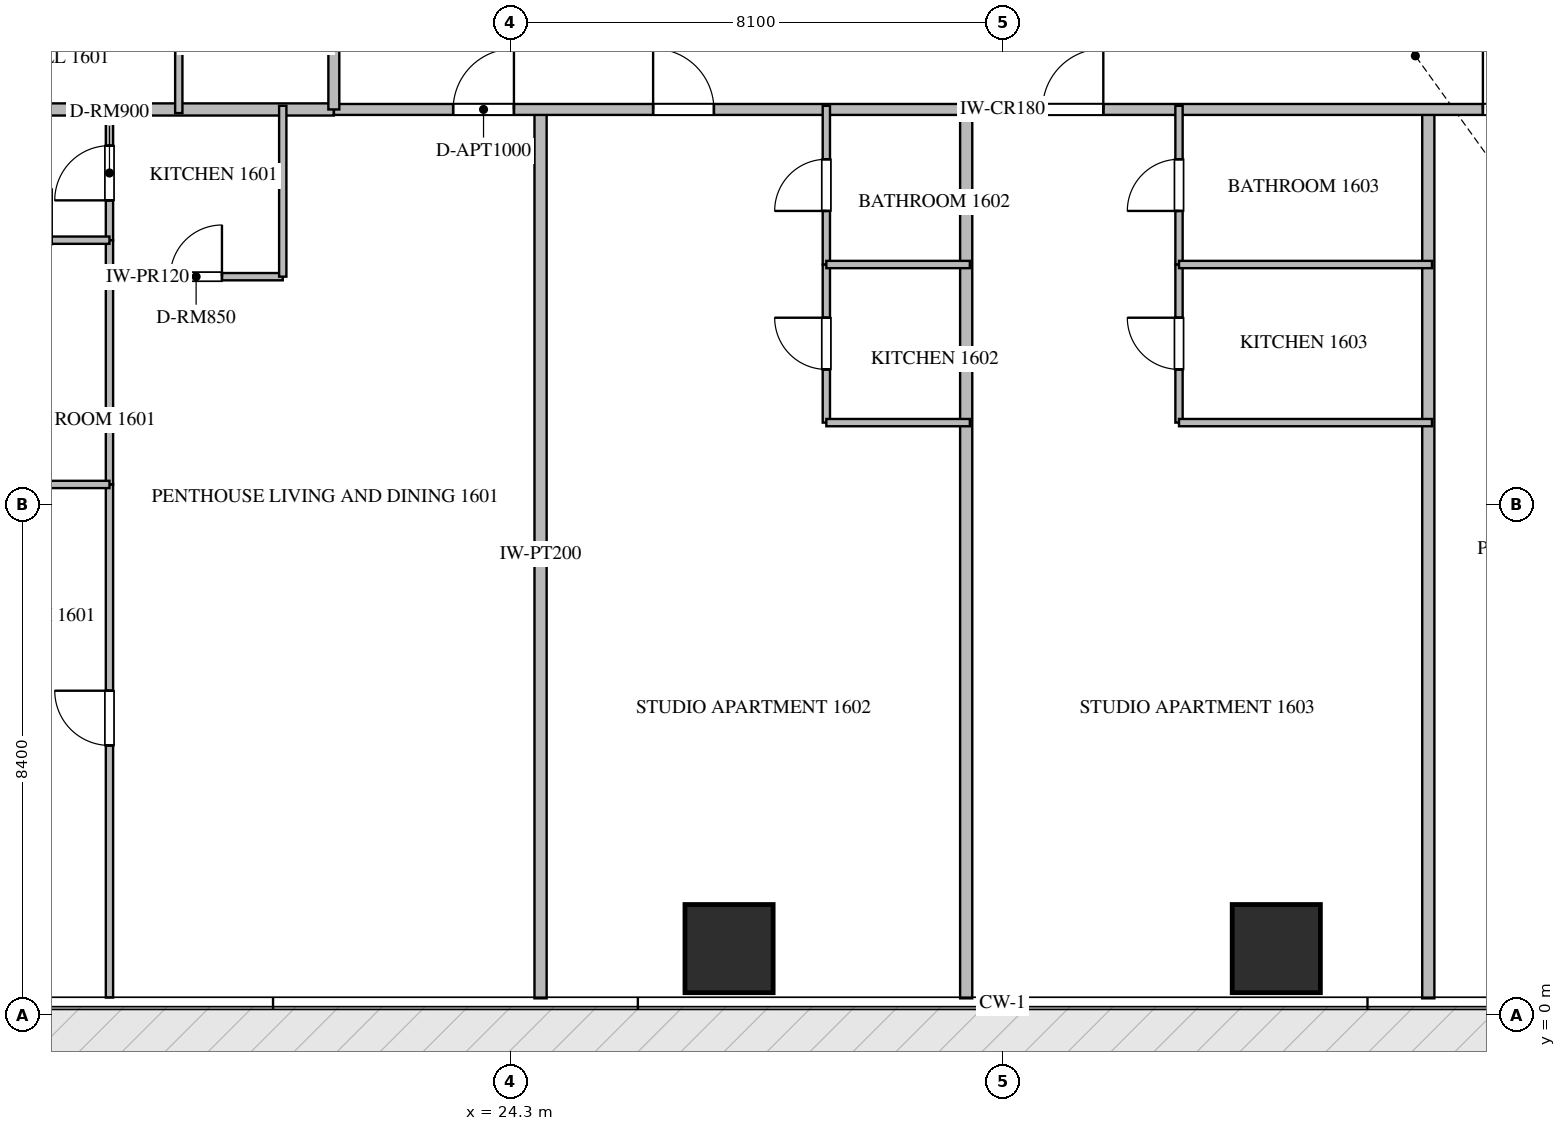
"""IFC4 building model, lengths in metres.
Left out: names, types, materials, properties, quantities, classifications, styles, units other than length and angle.
Written with IfcOpenShell. Run it as: python <this file> out.ifc"""

import sys

from ifc_helpers import new_model, si_unit, direction, frame, frame_2d, origin, origin_2d, place, context, subcontext, project, spatial, rectangle, extrude, source, transform, mapped, element, fill, save


model = new_model("IFC4")
c1 = context("Model", 3, precision=1e-05, world=origin(), true_north=direction((0.0, 1.0)))
c2 = subcontext(c1, "Body", "Model", "MODEL_VIEW")
j1 = project(units=[si_unit("LENGTHUNIT", "METRE"), si_unit("PLANEANGLEUNIT", "RADIAN")], contexts=[c1])
p1 = place(None, origin())
s1 = spatial("IfcSite", under=j1, at=p1, CompositionType="ELEMENT")
p2 = place(p1, origin())
s2 = spatial("IfcBuilding", under=s1, at=p2, CompositionType="ELEMENT")
p3 = place(p2, frame((0.0, 0.0, 67.95)))
s3 = spatial("IfcBuildingStorey", under=s2, at=p3, CompositionType="ELEMENT", Elevation=67.95)
m1 = source(origin(), c2, "Body", "SweptSolid", [
    extrude(rectangle(XDim=1.45, YDim=1.45, at=origin_2d()), origin(), (0.0, 0.0, 1.0), 3.75),
])
for number, where, z_axis, x_axis in (
    (1, (27.9, 1.1, -0.26), (0.0, 0.0, 1.0), (1.0, 0.0, 0.0)),
    (2, (36.9, 1.1, -0.26), (0.0, 0.0, 1.0), (1.0, 0.0, 0.0)),
):
    element("IfcColumn", number, at=place(p3, frame(where, z_axis=z_axis, x_axis=x_axis)), inside=s3, PredefinedType="COLUMN", context=c2, shape_type="MappedRepresentation", body=[
        mapped(m1, transform((0.0, 0.0, 0.0), scale=1.0)),
    ])
for number, where, z_axis, x_axis in (
    (3, (24.8, 0.282, 0.0), (0.0, 0.0, 1.0), (0.0, 1.0, 0.0)),
    (4, (31.8, 0.282, 0.0), (0.0, 0.0, 1.0), (0.0, 1.0, 0.0)),
    (5, (39.4, 0.282, 0.0), (0.0, 0.0, 1.0), (0.0, 1.0, 0.0)),
):
    element("IfcWall", number, at=place(p3, frame(where, z_axis=z_axis, x_axis=x_axis)), inside=s3, PredefinedType="PARTITIONING", context=c2, shape_type="SweptSolid", body=[
        extrude(rectangle(XDim=14.618, YDim=0.2, at=frame_2d((7.309, 0.0))), origin(), (0.0, 0.0, 1.0), 3.49),
    ])
p4 = place(p3, frame((6.082, 14.9, 0.0), z_axis=(0.0, 0.0, 1.0), x_axis=(1.0, 0.0, 0.0)))
e6 = element("IfcWall", 6, at=p4, inside=s3, PredefinedType="PARTITIONING", context=c2, shape_type="SweptSolid", body=[
    extrude(rectangle(XDim=15.318, YDim=0.2, at=frame_2d((7.659, 0.0))), origin(), (0.0, 0.0, 1.0), 3.49),
])
p5 = place(p3, frame((21.402, 14.9, 0.0), z_axis=(0.0, 0.0, 1.0), x_axis=(1.0, 0.0, 0.0)))
e7 = element("IfcWall", 7, at=p5, inside=s3, PredefinedType="PARTITIONING", context=c2, shape_type="SweptSolid", body=[
    extrude(rectangle(XDim=21.996, YDim=0.18, at=frame_2d((10.998, 0.0))), origin(), (0.0, 0.0, 1.0), 3.49),
])
p6 = place(p5, frame((1.96, 0.0, 0.0)))
e8 = element("IfcOpeningElement", 8, at=p6, cuts=e7, PredefinedType="OPENING", context=c2, shape_type="SweptSolid", body=[
    extrude(rectangle(XDim=1.0, YDim=2.15, at=frame_2d((0.5, 1.075))), frame((0.0, 0.1, 0.0), z_axis=(0.0, -1.0, 0.0), x_axis=(1.0, 0.0, 0.0)), (0.0, 0.0, 1.0), 0.2),
])
p7 = place(p5, frame((5.249, 0.0, 0.0)))
e9 = element("IfcOpeningElement", 9, at=p7, cuts=e7, PredefinedType="OPENING", context=c2, shape_type="SweptSolid", body=[
    extrude(rectangle(XDim=1.0, YDim=2.15, at=frame_2d((0.5, 1.075))), frame((0.0, 0.1, 0.0), z_axis=(0.0, -1.0, 0.0), x_axis=(1.0, 0.0, 0.0)), (0.0, 0.0, 1.0), 0.2),
])
p8 = place(p5, frame((11.653, 0.0, 0.0)))
e10 = element("IfcOpeningElement", 10, at=p8, cuts=e7, PredefinedType="OPENING", context=c2, shape_type="SweptSolid", body=[
    extrude(rectangle(XDim=1.0, YDim=2.15, at=frame_2d((0.5, 1.075))), frame((0.0, 0.1, 0.0), z_axis=(0.0, -1.0, 0.0), x_axis=(1.0, 0.0, 0.0)), (0.0, 0.0, 1.0), 0.2),
])
p9 = place(p5, frame((18.896, 0.0, 0.0)))
e11 = element("IfcOpeningElement", 11, at=p9, cuts=e7, PredefinedType="OPENING", context=c2, shape_type="SweptSolid", body=[
    extrude(rectangle(XDim=1.0, YDim=2.15, at=frame_2d((0.5, 1.075))), frame((0.0, 0.1, 0.0), z_axis=(0.0, -1.0, 0.0), x_axis=(1.0, 0.0, 0.0)), (0.0, 0.0, 1.0), 0.2),
])
p10 = place(p3, frame((21.4, 14.9, 0.0), z_axis=(0.0, 0.0, 1.0), x_axis=(0.0, 1.0, 0.0)))
e12 = element("IfcWall", 12, at=p10, inside=s3, PredefinedType="PARTITIONING", context=c2, shape_type="SweptSolid", body=[
    extrude(rectangle(XDim=20.6, YDim=0.18, at=frame_2d((10.3, 0.0))), origin(), (0.0, 0.0, 1.0), 3.49),
])
p11 = place(p10, frame((5.527, 0.0, 0.0)))
e13 = element("IfcOpeningElement", 13, at=p11, cuts=e12, PredefinedType="OPENING", context=c2, shape_type="SweptSolid", body=[
    extrude(rectangle(XDim=1.0, YDim=2.15, at=frame_2d((0.5, 1.075))), frame((0.0, 0.1, 0.0), z_axis=(0.0, -1.0, 0.0), x_axis=(1.0, 0.0, 0.0)), (0.0, 0.0, 1.0), 0.2),
])
p12 = place(p10, frame((10.604, 0.0, 0.0)))
e14 = element("IfcOpeningElement", 14, at=p12, cuts=e12, PredefinedType="OPENING", context=c2, shape_type="SweptSolid", body=[
    extrude(rectangle(XDim=1.0, YDim=2.15, at=frame_2d((0.5, 1.075))), frame((0.0, 0.1, 0.0), z_axis=(0.0, -1.0, 0.0), x_axis=(1.0, 0.0, 0.0)), (0.0, 0.0, 1.0), 0.2),
])
p13 = place(p3, frame((17.71, 12.15, 0.0), z_axis=(0.0, 0.0, 1.0), x_axis=(1.0, 0.0, 0.0)))
e15 = element("IfcWall", 15, at=p13, inside=s3, PredefinedType="PARTITIONING", context=c2, shape_type="SweptSolid", body=[
    extrude(rectangle(XDim=2.85, YDim=0.12, at=frame_2d((1.425, 0.0))), origin(), (0.0, 0.0, 1.0), 3.49),
])
p14 = place(p13, frame((1.0, 0.0, 0.0)))
e16 = element("IfcOpeningElement", 16, at=p14, cuts=e15, PredefinedType="OPENING", context=c2, shape_type="SweptSolid", body=[
    extrude(rectangle(XDim=0.85, YDim=2.1, at=frame_2d((0.425, 1.05))), frame((0.0, 0.07, 0.0), z_axis=(0.0, -1.0, 0.0), x_axis=(1.0, 0.0, 0.0)), (0.0, 0.0, 1.0), 0.14),
])
p15 = place(p3, frame((20.56, 12.15, 0.0), z_axis=(0.0, 0.0, 1.0), x_axis=(0.0, 1.0, 0.0)))
e17 = element("IfcWall", 17, at=p15, inside=s3, PredefinedType="PARTITIONING", context=c2, shape_type="SweptSolid", body=[
    extrude(rectangle(XDim=2.81, YDim=0.12, at=frame_2d((1.405, 0.0))), origin(), (0.0, 0.0, 1.0), 3.49),
])
p16 = place(p3, frame((17.71, 12.75, 0.0), z_axis=(0.0, 0.0, 1.0), x_axis=(0.0, 1.0, 0.0)))
e18 = element("IfcWall", 18, at=p16, inside=s3, PredefinedType="PARTITIONING", context=c2, shape_type="SweptSolid", body=[
    extrude(rectangle(XDim=2.21, YDim=0.12, at=frame_2d((1.105, 0.0))), origin(), (0.0, 0.0, 1.0), 3.49),
])
p17 = place(p16, frame((0.655, 0.0, 0.0)))
e19 = element("IfcOpeningElement", 19, at=p17, cuts=e18, PredefinedType="OPENING", context=c2, shape_type="SweptSolid", body=[
    extrude(rectangle(XDim=0.9, YDim=2.1, at=frame_2d((0.45, 1.05))), frame((0.0, 0.07, 0.0), z_axis=(0.0, -1.0, 0.0), x_axis=(1.0, 0.0, 0.0)), (0.0, 0.0, 1.0), 0.14),
])
p18 = place(p3, frame((17.71, 0.295, 0.0), z_axis=(0.0, 0.0, 1.0), x_axis=(0.0, 1.0, 0.0)))
e20 = element("IfcWall", 20, at=p18, inside=s3, PredefinedType="PARTITIONING", context=c2, shape_type="SweptSolid", body=[
    extrude(rectangle(XDim=8.438, YDim=0.12, at=frame_2d((4.219, 0.0))), origin(), (0.0, 0.0, 1.0), 3.49),
])
p19 = place(p18, frame((4.146, 0.0, 0.0)))
e21 = element("IfcOpeningElement", 21, at=p19, cuts=e20, PredefinedType="OPENING", context=c2, shape_type="SweptSolid", body=[
    extrude(rectangle(XDim=0.9, YDim=2.1, at=frame_2d((0.45, 1.05))), frame((0.0, 0.07, 0.0), z_axis=(0.0, -1.0, 0.0), x_axis=(1.0, 0.0, 0.0)), (0.0, 0.0, 1.0), 0.14),
])
p20 = place(p3, frame((17.71, 8.735, 0.0), z_axis=(0.0, 0.0, 1.0), x_axis=(0.0, 1.0, 0.0)))
e22 = element("IfcWall", 22, at=p20, inside=s3, PredefinedType="PARTITIONING", context=c2, shape_type="SweptSolid", body=[
    extrude(rectangle(XDim=4.013, YDim=0.12, at=frame_2d((2.006, 0.0))), origin(), (0.0, 0.0, 1.0), 3.49),
])
p21 = place(p3, frame((12.86, 8.733, 0.0), z_axis=(0.0, 0.0, 1.0), x_axis=(1.0, 0.0, 0.0)))
e23 = element("IfcWall", 23, at=p21, inside=s3, PredefinedType="PARTITIONING", context=c2, shape_type="SweptSolid", body=[
    extrude(rectangle(XDim=4.85, YDim=0.12, at=frame_2d((2.425, 0.0))), origin(), (0.0, 0.0, 1.0), 3.49),
])
p22 = place(p3, frame((14.962, 12.75, 0.0), z_axis=(0.0, 0.0, 1.0), x_axis=(1.0, 0.0, 0.0)))
e24 = element("IfcWall", 24, at=p22, inside=s3, PredefinedType="PARTITIONING", context=c2, shape_type="SweptSolid", body=[
    extrude(rectangle(XDim=2.748, YDim=0.12, at=frame_2d((1.374, 0.0))), origin(), (0.0, 0.0, 1.0), 3.49),
])
p23 = place(p22, frame((0.949, 0.0, 0.0)))
e25 = element("IfcOpeningElement", 25, at=p23, cuts=e24, PredefinedType="OPENING", context=c2, shape_type="SweptSolid", body=[
    extrude(rectangle(XDim=0.85, YDim=2.1, at=frame_2d((0.425, 1.05))), frame((0.0, 0.07, 0.0), z_axis=(0.0, -1.0, 0.0), x_axis=(1.0, 0.0, 0.0)), (0.0, 0.0, 1.0), 0.14),
])
p24 = place(p3, frame((29.5, 9.75, 0.0), z_axis=(0.0, 0.0, 1.0), x_axis=(0.0, 1.0, 0.0)))
e26 = element("IfcWall", 26, at=p24, inside=s3, PredefinedType="PARTITIONING", context=c2, shape_type="SweptSolid", body=[
    extrude(rectangle(XDim=2.6, YDim=0.12, at=frame_2d((1.3, 0.0))), origin(), (0.0, 0.0, 1.0), 3.49),
])
p25 = place(p24, frame((0.875, 0.0, 0.0)))
e27 = element("IfcOpeningElement", 27, at=p25, cuts=e26, PredefinedType="OPENING", context=c2, shape_type="SweptSolid", body=[
    extrude(rectangle(XDim=0.85, YDim=2.1, at=frame_2d((0.425, 1.05))), frame((0.0, 0.07, 0.0), z_axis=(0.0, -1.0, 0.0), x_axis=(1.0, 0.0, 0.0)), (0.0, 0.0, 1.0), 0.14),
])
p26 = place(p3, frame((29.5, 12.352, 0.0), z_axis=(0.0, 0.0, 1.0), x_axis=(0.0, 1.0, 0.0)))
e28 = element("IfcWall", 28, at=p26, inside=s3, PredefinedType="PARTITIONING", context=c2, shape_type="SweptSolid", body=[
    extrude(rectangle(XDim=2.608, YDim=0.12, at=frame_2d((1.304, 0.0))), origin(), (0.0, 0.0, 1.0), 3.49),
])
p27 = place(p26, frame((0.879, 0.0, 0.0)))
e29 = element("IfcOpeningElement", 29, at=p27, cuts=e28, PredefinedType="OPENING", context=c2, shape_type="SweptSolid", body=[
    extrude(rectangle(XDim=0.85, YDim=2.1, at=frame_2d((0.425, 1.05))), frame((0.0, 0.07, 0.0), z_axis=(0.0, -1.0, 0.0), x_axis=(1.0, 0.0, 0.0)), (0.0, 0.0, 1.0), 0.14),
])
for number, where, z_axis, x_axis in (
    (30, (29.5, 12.35, 0.0), (0.0, 0.0, 1.0), (1.0, 0.0, 0.0)),
    (31, (29.5, 9.75, 0.0), (0.0, 0.0, 1.0), (1.0, 0.0, 0.0)),
):
    element("IfcWall", number, at=place(p3, frame(where, z_axis=z_axis, x_axis=x_axis)), inside=s3, PredefinedType="PARTITIONING", context=c2, shape_type="SweptSolid", body=[
        extrude(rectangle(XDim=2.36, YDim=0.12, at=frame_2d((1.18, 0.0))), origin(), (0.0, 0.0, 1.0), 3.49),
    ])
p28 = place(p3, frame((35.3, 9.75, 0.0), z_axis=(0.0, 0.0, 1.0), x_axis=(0.0, 1.0, 0.0)))
e32 = element("IfcWall", 32, at=p28, inside=s3, PredefinedType="PARTITIONING", context=c2, shape_type="SweptSolid", body=[
    extrude(rectangle(XDim=2.6, YDim=0.12, at=frame_2d((1.3, 0.0))), origin(), (0.0, 0.0, 1.0), 3.49),
])
p29 = place(p28, frame((0.875, 0.0, 0.0)))
e33 = element("IfcOpeningElement", 33, at=p29, cuts=e32, PredefinedType="OPENING", context=c2, shape_type="SweptSolid", body=[
    extrude(rectangle(XDim=0.85, YDim=2.1, at=frame_2d((0.425, 1.05))), frame((0.0, 0.07, 0.0), z_axis=(0.0, -1.0, 0.0), x_axis=(1.0, 0.0, 0.0)), (0.0, 0.0, 1.0), 0.14),
])
p30 = place(p3, frame((35.3, 12.352, 0.0), z_axis=(0.0, 0.0, 1.0), x_axis=(0.0, 1.0, 0.0)))
e34 = element("IfcWall", 34, at=p30, inside=s3, PredefinedType="PARTITIONING", context=c2, shape_type="SweptSolid", body=[
    extrude(rectangle(XDim=2.608, YDim=0.12, at=frame_2d((1.304, 0.0))), origin(), (0.0, 0.0, 1.0), 3.49),
])
p31 = place(p30, frame((0.879, 0.0, 0.0)))
e35 = element("IfcOpeningElement", 35, at=p31, cuts=e34, PredefinedType="OPENING", context=c2, shape_type="SweptSolid", body=[
    extrude(rectangle(XDim=0.85, YDim=2.1, at=frame_2d((0.425, 1.05))), frame((0.0, 0.07, 0.0), z_axis=(0.0, -1.0, 0.0), x_axis=(1.0, 0.0, 0.0)), (0.0, 0.0, 1.0), 0.14),
])
for number, where, z_axis, x_axis in (
    (36, (35.3, 12.35, 0.0), (0.0, 0.0, 1.0), (1.0, 0.0, 0.0)),
    (37, (35.3, 9.75, 0.0), (0.0, 0.0, 1.0), (1.0, 0.0, 0.0)),
):
    element("IfcWall", number, at=place(p3, frame(where, z_axis=z_axis, x_axis=x_axis)), inside=s3, PredefinedType="PARTITIONING", context=c2, shape_type="SweptSolid", body=[
        extrude(rectangle(XDim=4.16, YDim=0.12, at=frame_2d((2.08, 0.0))), origin(), (0.0, 0.0, 1.0), 3.49),
    ])
p32 = place(p3, frame((18.85, 14.84, 0.0), z_axis=(0.0, 0.0, 1.0), x_axis=(0.0, 1.0, 0.0)))
e38 = element("IfcWall", 38, at=p32, inside=s3, PredefinedType="PARTITIONING", context=c2, shape_type="SweptSolid", body=[
    extrude(rectangle(XDim=2.81, YDim=0.12, at=frame_2d((1.405, 0.0))), origin(), (0.0, 0.0, 1.0), 3.49),
])
m2 = source(origin(), c2, "Body", "SweptSolid", [
    extrude(rectangle(XDim=1.0, YDim=2.15, at=frame_2d((0.5, 1.075))), frame((0.0, 0.025, 0.0), z_axis=(0.0, -1.0, 0.0), x_axis=(1.0, 0.0, 0.0)), (0.0, 0.0, 1.0), 0.05),
])
p33 = place(p6, origin())
e39 = element("IfcDoor", 39, at=p33, inside=s3, OperationType="SINGLE_SWING_RIGHT", PredefinedType="DOOR", context=c2, shape_type="MappedRepresentation", body=[
    mapped(m2, transform((0.0, 0.0, 0.0), scale=1.0)),
])
fill(e8, e39)
p34 = place(p7, origin())
e40 = element("IfcDoor", 40, at=p34, inside=s3, OperationType="SINGLE_SWING_LEFT", PredefinedType="DOOR", context=c2, shape_type="MappedRepresentation", body=[
    mapped(m2, transform((0.0, 0.0, 0.0), scale=1.0)),
])
fill(e9, e40)
p35 = place(p8, origin())
e41 = element("IfcDoor", 41, at=p35, inside=s3, OperationType="SINGLE_SWING_RIGHT", PredefinedType="DOOR", context=c2, shape_type="MappedRepresentation", body=[
    mapped(m2, transform((0.0, 0.0, 0.0), scale=1.0)),
])
fill(e10, e41)
p36 = place(p9, origin())
e42 = element("IfcDoor", 42, at=p36, inside=s3, OperationType="SINGLE_SWING_LEFT", PredefinedType="DOOR", context=c2, shape_type="MappedRepresentation", body=[
    mapped(m2, transform((0.0, 0.0, 0.0), scale=1.0)),
])
fill(e11, e42)
m3 = source(origin(), c2, "Body", "SweptSolid", [
    extrude(rectangle(XDim=0.85, YDim=2.1, at=frame_2d((0.425, 1.05))), frame((0.0, 0.025, 0.0), z_axis=(0.0, -1.0, 0.0), x_axis=(1.0, 0.0, 0.0)), (0.0, 0.0, 1.0), 0.05),
])
p37 = place(p14, origin())
e43 = element("IfcDoor", 43, at=p37, inside=s3, OperationType="SINGLE_SWING_RIGHT", PredefinedType="DOOR", context=c2, shape_type="MappedRepresentation", body=[
    mapped(m3, transform((0.0, 0.0, 0.0), scale=1.0)),
])
fill(e16, e43)
m4 = source(origin(), c2, "Body", "SweptSolid", [
    extrude(rectangle(XDim=0.9, YDim=2.1, at=frame_2d((0.45, 1.05))), frame((0.0, 0.025, 0.0), z_axis=(0.0, -1.0, 0.0), x_axis=(1.0, 0.0, 0.0)), (0.0, 0.0, 1.0), 0.05),
])
p38 = place(p17, origin())
e44 = element("IfcDoor", 44, at=p38, inside=s3, OperationType="SINGLE_SWING_LEFT", PredefinedType="DOOR", context=c2, shape_type="MappedRepresentation", body=[
    mapped(m4, transform((0.0, 0.0, 0.0), scale=1.0)),
])
fill(e19, e44)
p39 = place(p19, origin())
e45 = element("IfcDoor", 45, at=p39, inside=s3, OperationType="SINGLE_SWING_RIGHT", PredefinedType="DOOR", context=c2, shape_type="MappedRepresentation", body=[
    mapped(m4, transform((0.0, 0.0, 0.0), scale=1.0)),
])
fill(e21, e45)
p40 = place(p25, origin())
e46 = element("IfcDoor", 46, at=p40, inside=s3, OperationType="SINGLE_SWING_RIGHT", PredefinedType="DOOR", context=c2, shape_type="MappedRepresentation", body=[
    mapped(m3, transform((0.0, 0.0, 0.0), scale=1.0)),
])
fill(e27, e46)
p41 = place(p27, origin())
e47 = element("IfcDoor", 47, at=p41, inside=s3, OperationType="SINGLE_SWING_LEFT", PredefinedType="DOOR", context=c2, shape_type="MappedRepresentation", body=[
    mapped(m3, transform((0.0, 0.0, 0.0), scale=1.0)),
])
fill(e29, e47)
p42 = place(p29, origin())
e48 = element("IfcDoor", 48, at=p42, inside=s3, OperationType="SINGLE_SWING_RIGHT", PredefinedType="DOOR", context=c2, shape_type="MappedRepresentation", body=[
    mapped(m3, transform((0.0, 0.0, 0.0), scale=1.0)),
])
fill(e33, e48)
p43 = place(p31, origin())
e49 = element("IfcDoor", 49, at=p43, inside=s3, OperationType="SINGLE_SWING_LEFT", PredefinedType="DOOR", context=c2, shape_type="MappedRepresentation", body=[
    mapped(m3, transform((0.0, 0.0, 0.0), scale=1.0)),
])
fill(e35, e49)
save(model, sys.argv[1])
